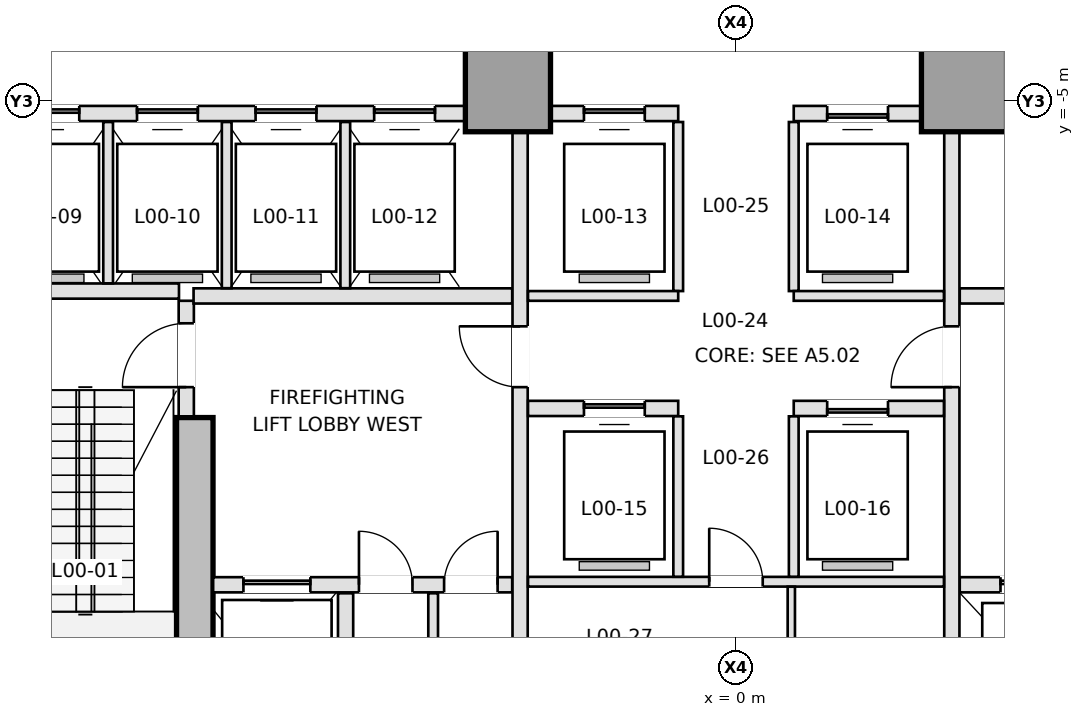
"""IFC4 building model, lengths in metres.
Left out: names, types, materials, properties, quantities, classifications, styles, units other than length and angle.
Written with IfcOpenShell. Run it as: python <this file> out.ifc"""

import sys

from ifc_helpers import new_model, si_unit, direction, frame, frame_2d, origin, origin_2d, place, context, subcontext, project, spatial, rectangle, extrude, element, fill, save


model = new_model("IFC4")
c1 = context("Model", 3, precision=1e-05, world=origin(), true_north=direction((0.0, 1.0)))
c2 = subcontext(c1, "Body", "Model", "MODEL_VIEW")
j1 = project(units=[si_unit("LENGTHUNIT", "METRE"), si_unit("PLANEANGLEUNIT", "RADIAN")], contexts=[c1])
p1 = place(None, origin())
s1 = spatial("IfcSite", under=j1, at=p1, CompositionType="ELEMENT")
p2 = place(p1, origin())
s2 = spatial("IfcBuilding", under=s1, at=p2, CompositionType="ELEMENT")
p3 = place(p2, origin())
s3 = spatial("IfcBuildingStorey", under=s2, at=p3, CompositionType="ELEMENT", Elevation=0.0)
p4 = place(p3, frame((-8.9, -16.15, 0.0), z_axis=(0.0, 0.0, 1.0), x_axis=(0.0, 1.0, 0.0)))
e1 = element("IfcWall", 1, at=p4, inside=s3, PredefinedType="SHEAR", context=c2, shape_type="SweptSolid", body=[
    extrude(rectangle(XDim=5.95, YDim=0.6, at=frame_2d((2.975, 0.0))), origin(), (0.0, 0.0, 1.0), 5.0),
])
for number, where, z_axis, x_axis in (
    (2, (-3.75, -4.8, 0.0), (0.0, 0.0, 1.0), (1.0, 0.0, 0.0)),
    (3, (3.75, -4.8, 0.0), (0.0, 0.0, 1.0), (1.0, 0.0, 0.0)),
):
    element("IfcColumn", number, at=place(p3, frame(where, z_axis=z_axis, x_axis=x_axis)), inside=s3, PredefinedType="COLUMN", context=c2, shape_type="SweptSolid", body=[
        extrude(rectangle(XDim=1.4, YDim=1.4, at=origin_2d()), origin(), (0.0, 0.0, 1.0), 5.0),
    ])
p5 = place(p3, frame((-9.04, -10.18, 0.0), z_axis=(0.0, 0.0, 1.0), x_axis=(0.0, 1.0, 0.0)))
e4 = element("IfcWall", 4, at=p5, inside=s3, PredefinedType="PARTITIONING", context=c2, shape_type="SweptSolid", body=[
    extrude(rectangle(XDim=1.9, YDim=0.25, at=frame_2d((0.95, 0.0))), origin(), (0.0, 0.0, 1.0), 4.7),
])
p6 = place(p5, frame((0.48, 0.0, 0.0)))
e5 = element("IfcOpeningElement", 5, at=p6, cuts=e4, PredefinedType="OPENING", context=c2, shape_type="SweptSolid", body=[
    extrude(rectangle(XDim=1.05, YDim=2.15, at=frame_2d((0.525, 1.075))), frame((0.0, 0.135, 0.0), z_axis=(0.0, -1.0, 0.0), x_axis=(1.0, 0.0, 0.0)), (0.0, 0.0, 1.0), 0.27),
])
p7 = place(p3, frame((-12.38, -8.12, 0.0), z_axis=(0.0, 0.0, 1.0), x_axis=(1.0, 0.0, 0.0)))
e6 = element("IfcWall", 6, at=p7, inside=s3, PredefinedType="PARTITIONING", context=c2, shape_type="SweptSolid", body=[
    extrude(rectangle(XDim=3.22, YDim=0.25, at=frame_2d((1.61, 0.0))), origin(), (0.0, 0.0, 1.0), 4.7),
])
p8 = place(p3, frame((-8.598, -12.95, 0.0), z_axis=(0.0, 0.0, 1.0), x_axis=(1.0, 0.0, 0.0)))
e7 = element("IfcWall", 7, at=p8, inside=s3, PredefinedType="PARTITIONING", context=c2, shape_type="SweptSolid", body=[
    extrude(rectangle(XDim=4.918, YDim=0.25, at=frame_2d((2.459, 0.0))), origin(), (0.0, 0.0, 1.0), 4.7),
])
p9 = place(p8, frame((0.498, 0.0, 0.0)))
e8 = element("IfcOpeningElement", 8, at=p9, cuts=e7, PredefinedType="OPENING", context=c2, shape_type="SweptSolid", body=[
    extrude(rectangle(XDim=1.1, YDim=2.15, at=frame_2d((0.55, 1.075))), frame((0.0, 0.135, 0.0), z_axis=(0.0, -1.0, 0.0), x_axis=(1.0, 0.0, 0.0)), (0.0, 0.0, 1.0), 0.27),
])
p10 = place(p8, frame((2.398, 0.0, 0.0)))
e9 = element("IfcOpeningElement", 9, at=p10, cuts=e7, PredefinedType="OPENING", context=c2, shape_type="SweptSolid", body=[
    extrude(rectangle(XDim=0.88, YDim=2.1, at=frame_2d((0.44, 1.05))), frame((0.0, 0.135, 0.0), z_axis=(0.0, -1.0, 0.0), x_axis=(1.0, 0.0, 0.0)), (0.0, 0.0, 1.0), 0.27),
])
p11 = place(p8, frame((3.798, 0.0, 0.0)))
e10 = element("IfcOpeningElement", 10, at=p11, cuts=e7, PredefinedType="OPENING", context=c2, shape_type="SweptSolid", body=[
    extrude(rectangle(XDim=0.88, YDim=2.1, at=frame_2d((0.44, 1.05))), frame((0.0, 0.135, 0.0), z_axis=(0.0, -1.0, 0.0), x_axis=(1.0, 0.0, 0.0)), (0.0, 0.0, 1.0), 0.27),
])
p12 = place(p3, frame((3.68, -12.95, 0.0), z_axis=(0.0, 0.0, 1.0), x_axis=(1.0, 0.0, 0.0)))
e11 = element("IfcWall", 11, at=p12, inside=s3, PredefinedType="PARTITIONING", context=c2, shape_type="SweptSolid", body=[
    extrude(rectangle(XDim=4.918, YDim=0.25, at=frame_2d((2.459, 0.0))), origin(), (0.0, 0.0, 1.0), 4.7),
])
p13 = place(p12, frame((3.32, 0.0, 0.0)))
e12 = element("IfcOpeningElement", 12, at=p13, cuts=e11, PredefinedType="OPENING", context=c2, shape_type="SweptSolid", body=[
    extrude(rectangle(XDim=1.1, YDim=2.15, at=frame_2d((0.55, 1.075))), frame((0.0, 0.135, 0.0), z_axis=(0.0, -1.0, 0.0), x_axis=(1.0, 0.0, 0.0)), (0.0, 0.0, 1.0), 0.27),
])
p14 = place(p12, frame((0.67, 0.0, 0.0)))
e13 = element("IfcOpeningElement", 13, at=p14, cuts=e11, PredefinedType="OPENING", context=c2, shape_type="SweptSolid", body=[
    extrude(rectangle(XDim=1.2, YDim=2.15, at=frame_2d((0.6, 1.075))), frame((0.0, 0.135, 0.0), z_axis=(0.0, -1.0, 0.0), x_axis=(1.0, 0.0, 0.0)), (0.0, 0.0, 1.0), 0.27),
])
p15 = place(p3, frame((-6.42, -15.848, 0.0), z_axis=(0.0, 0.0, 1.0), x_axis=(0.0, 1.0, 0.0)))
e14 = element("IfcWall", 14, at=p15, inside=s3, PredefinedType="PARTITIONING", context=c2, shape_type="SweptSolid", body=[
    extrude(rectangle(XDim=2.758, YDim=0.25, at=frame_2d((1.379, 0.0))), origin(), (0.0, 0.0, 1.0), 4.7),
])
p16 = place(p3, frame((-4.98, -15.848, 0.0), z_axis=(0.0, 0.0, 1.0), x_axis=(0.0, 1.0, 0.0)))
e15 = element("IfcWall", 15, at=p16, inside=s3, PredefinedType="PARTITIONING", context=c2, shape_type="SweptSolid", body=[
    extrude(rectangle(XDim=2.758, YDim=0.16, at=frame_2d((1.379, 0.0))), origin(), (0.0, 0.0, 1.0), 4.7),
])
for number, where, z_axis, x_axis in (
    (16, (-8.92, -8.2, 0.0), (0.0, 0.0, 1.0), (1.0, 0.0, 0.0)),
    (17, (3.68, -8.2, 0.0), (0.0, 0.0, 1.0), (1.0, 0.0, 0.0)),
):
    element("IfcWall", number, at=place(p3, frame(where, z_axis=z_axis, x_axis=x_axis)), inside=s3, PredefinedType="PARTITIONING", context=c2, shape_type="SweptSolid", body=[
        extrude(rectangle(XDim=5.24, YDim=0.25, at=frame_2d((2.62, 0.0))), origin(), (0.0, 0.0, 1.0), 4.7),
    ])
p17 = place(p3, frame((-3.55, -15.648, 0.0), z_axis=(0.0, 0.0, 1.0), x_axis=(0.0, 1.0, 0.0)))
e18 = element("IfcWall", 18, at=p17, inside=s3, PredefinedType="PARTITIONING", context=c2, shape_type="SweptSolid", body=[
    extrude(rectangle(XDim=10.146, YDim=0.25, at=frame_2d((5.073, 0.0))), origin(), (0.0, 0.0, 1.0), 4.7),
])
p18 = place(p17, frame((5.948, 0.0, 0.0)))
e19 = element("IfcOpeningElement", 19, at=p18, cuts=e18, PredefinedType="OPENING", context=c2, shape_type="SweptSolid", body=[
    extrude(rectangle(XDim=1.0, YDim=2.15, at=frame_2d((0.5, 1.075))), frame((0.0, 0.135, 0.0), z_axis=(0.0, -1.0, 0.0), x_axis=(1.0, 0.0, 0.0)), (0.0, 0.0, 1.0), 0.27),
])
p19 = place(p3, frame((3.55, -15.648, 0.0), z_axis=(0.0, 0.0, 1.0), x_axis=(0.0, 1.0, 0.0)))
e20 = element("IfcWall", 20, at=p19, inside=s3, PredefinedType="PARTITIONING", context=c2, shape_type="SweptSolid", body=[
    extrude(rectangle(XDim=10.146, YDim=0.25, at=frame_2d((5.073, 0.0))), origin(), (0.0, 0.0, 1.0), 4.7),
])
p20 = place(p19, frame((5.948, 0.0, 0.0)))
e21 = element("IfcOpeningElement", 21, at=p20, cuts=e20, PredefinedType="OPENING", context=c2, shape_type="SweptSolid", body=[
    extrude(rectangle(XDim=1.0, YDim=2.15, at=frame_2d((0.5, 1.075))), frame((0.0, 0.135, 0.0), z_axis=(0.0, -1.0, 0.0), x_axis=(1.0, 0.0, 0.0)), (0.0, 0.0, 1.0), 0.27),
])
p21 = place(p3, frame((-12.248, -5.2, 0.0), z_axis=(0.0, 0.0, 1.0), x_axis=(1.0, 0.0, 0.0)))
e22 = element("IfcWall", 22, at=p21, inside=s3, PredefinedType="PARTITIONING", context=c2, shape_type="SweptSolid", body=[
    extrude(rectangle(XDim=7.796, YDim=0.25, at=frame_2d((3.898, 0.0))), origin(), (0.0, 0.0, 1.0), 4.7),
])
p22 = place(p21, frame((0.448, 0.0, 0.0)))
e23 = element("IfcOpeningElement", 23, at=p22, cuts=e22, PredefinedType="OPENING", context=c2, shape_type="SweptSolid", body=[
    extrude(rectangle(XDim=1.0, YDim=2.15, at=frame_2d((0.5, 1.075))), frame((0.0, 0.135, 0.0), z_axis=(0.0, -1.0, 0.0), x_axis=(1.0, 0.0, 0.0)), (0.0, 0.0, 1.0), 0.27),
])
p23 = place(p21, frame((2.398, 0.0, 0.0)))
e24 = element("IfcOpeningElement", 24, at=p23, cuts=e22, PredefinedType="OPENING", context=c2, shape_type="SweptSolid", body=[
    extrude(rectangle(XDim=1.0, YDim=2.15, at=frame_2d((0.5, 1.075))), frame((0.0, 0.135, 0.0), z_axis=(0.0, -1.0, 0.0), x_axis=(1.0, 0.0, 0.0)), (0.0, 0.0, 1.0), 0.27),
])
p24 = place(p21, frame((4.348, 0.0, 0.0)))
e25 = element("IfcOpeningElement", 25, at=p24, cuts=e22, PredefinedType="OPENING", context=c2, shape_type="SweptSolid", body=[
    extrude(rectangle(XDim=1.0, YDim=2.15, at=frame_2d((0.5, 1.075))), frame((0.0, 0.135, 0.0), z_axis=(0.0, -1.0, 0.0), x_axis=(1.0, 0.0, 0.0)), (0.0, 0.0, 1.0), 0.27),
])
p25 = place(p21, frame((6.298, 0.0, 0.0)))
e26 = element("IfcOpeningElement", 26, at=p25, cuts=e22, PredefinedType="OPENING", context=c2, shape_type="SweptSolid", body=[
    extrude(rectangle(XDim=1.0, YDim=2.15, at=frame_2d((0.5, 1.075))), frame((0.0, 0.135, 0.0), z_axis=(0.0, -1.0, 0.0), x_axis=(1.0, 0.0, 0.0)), (0.0, 0.0, 1.0), 0.27),
])
p26 = place(p3, frame((-3.048, -5.2, 0.0), z_axis=(0.0, 0.0, 1.0), x_axis=(1.0, 0.0, 0.0)))
e27 = element("IfcWall", 27, at=p26, inside=s3, PredefinedType="PARTITIONING", context=c2, shape_type="SweptSolid", body=[
    extrude(rectangle(XDim=2.098, YDim=0.25, at=frame_2d((1.049, 0.0))), origin(), (0.0, 0.0, 1.0), 4.7),
])
p27 = place(p26, frame((0.548, 0.0, 0.0)))
e28 = element("IfcOpeningElement", 28, at=p27, cuts=e27, PredefinedType="OPENING", context=c2, shape_type="SweptSolid", body=[
    extrude(rectangle(XDim=1.0, YDim=2.15, at=frame_2d((0.5, 1.075))), frame((0.0, 0.135, 0.0), z_axis=(0.0, -1.0, 0.0), x_axis=(1.0, 0.0, 0.0)), (0.0, 0.0, 1.0), 0.27),
])
p28 = place(p3, frame((0.95, -5.2, 0.0), z_axis=(0.0, 0.0, 1.0), x_axis=(1.0, 0.0, 0.0)))
e29 = element("IfcWall", 29, at=p28, inside=s3, PredefinedType="PARTITIONING", context=c2, shape_type="SweptSolid", body=[
    extrude(rectangle(XDim=2.098, YDim=0.25, at=frame_2d((1.049, 0.0))), origin(), (0.0, 0.0, 1.0), 4.7),
])
p29 = place(p28, frame((0.55, 0.0, 0.0)))
e30 = element("IfcOpeningElement", 30, at=p29, cuts=e29, PredefinedType="OPENING", context=c2, shape_type="SweptSolid", body=[
    extrude(rectangle(XDim=1.0, YDim=2.15, at=frame_2d((0.5, 1.075))), frame((0.0, 0.135, 0.0), z_axis=(0.0, -1.0, 0.0), x_axis=(1.0, 0.0, 0.0)), (0.0, 0.0, 1.0), 0.27),
])
p30 = place(p3, frame((-10.325, -7.993, 0.0), z_axis=(0.0, 0.0, 1.0), x_axis=(0.0, 1.0, 0.0)))
e31 = element("IfcWall", 31, at=p30, inside=s3, PredefinedType="PARTITIONING", context=c2, shape_type="SweptSolid", body=[
    extrude(rectangle(XDim=2.653, YDim=0.16, at=frame_2d((1.326, 0.0))), origin(), (0.0, 0.0, 1.0), 4.7),
])
for number, where, z_axis, x_axis in (
    (32, (-8.375, -8.073, 0.0), (0.0, 0.0, 1.0), (0.0, 1.0, 0.0)),
    (33, (-6.425, -8.073, 0.0), (0.0, 0.0, 1.0), (0.0, 1.0, 0.0)),
):
    element("IfcWall", number, at=place(p3, frame(where, z_axis=z_axis, x_axis=x_axis)), inside=s3, PredefinedType="PARTITIONING", context=c2, shape_type="SweptSolid", body=[
        extrude(rectangle(XDim=2.733, YDim=0.16, at=frame_2d((1.366, 0.0))), origin(), (0.0, 0.0, 1.0), 4.7),
    ])
for number, where, z_axis, x_axis in (
    (34, (-0.95, -8.12, 0.0), (0.0, 0.0, 1.0), (0.0, 1.0, 0.0)),
    (35, (0.95, -8.12, 0.0), (0.0, 0.0, 1.0), (0.0, 1.0, 0.0)),
):
    element("IfcWall", number, at=place(p3, frame(where, z_axis=z_axis, x_axis=x_axis)), inside=s3, PredefinedType="PARTITIONING", context=c2, shape_type="SweptSolid", body=[
        extrude(rectangle(XDim=2.78, YDim=0.16, at=frame_2d((1.39, 0.0))), origin(), (0.0, 0.0, 1.0), 4.7),
    ])
for number, where, z_axis, x_axis in (
    (36, (-3.42, -8.2, 0.0), (0.0, 0.0, 1.0), (1.0, 0.0, 0.0)),
    (37, (0.95, -8.2, 0.0), (0.0, 0.0, 1.0), (1.0, 0.0, 0.0)),
):
    element("IfcWall", number, at=place(p3, frame(where, z_axis=z_axis, x_axis=x_axis)), inside=s3, PredefinedType="PARTITIONING", context=c2, shape_type="SweptSolid", body=[
        extrude(rectangle(XDim=2.47, YDim=0.16, at=frame_2d((1.235, 0.0))), origin(), (0.0, 0.0, 1.0), 4.7),
    ])
p31 = place(p3, frame((-3.42, -10.05, 0.0), z_axis=(0.0, 0.0, 1.0), x_axis=(1.0, 0.0, 0.0)))
e38 = element("IfcWall", 38, at=p31, inside=s3, PredefinedType="PARTITIONING", context=c2, shape_type="SweptSolid", body=[
    extrude(rectangle(XDim=2.47, YDim=0.25, at=frame_2d((1.235, 0.0))), origin(), (0.0, 0.0, 1.0), 4.7),
])
p32 = place(p31, frame((0.92, 0.0, 0.0)))
e39 = element("IfcOpeningElement", 39, at=p32, cuts=e38, PredefinedType="OPENING", context=c2, shape_type="SweptSolid", body=[
    extrude(rectangle(XDim=1.0, YDim=2.15, at=frame_2d((0.5, 1.075))), frame((0.0, 0.135, 0.0), z_axis=(0.0, -1.0, 0.0), x_axis=(1.0, 0.0, 0.0)), (0.0, 0.0, 1.0), 0.27),
])
p33 = place(p3, frame((0.95, -10.05, 0.0), z_axis=(0.0, 0.0, 1.0), x_axis=(1.0, 0.0, 0.0)))
e40 = element("IfcWall", 40, at=p33, inside=s3, PredefinedType="PARTITIONING", context=c2, shape_type="SweptSolid", body=[
    extrude(rectangle(XDim=2.47, YDim=0.25, at=frame_2d((1.235, 0.0))), origin(), (0.0, 0.0, 1.0), 4.7),
])
p34 = place(p33, frame((0.55, 0.0, 0.0)))
e41 = element("IfcOpeningElement", 41, at=p34, cuts=e40, PredefinedType="OPENING", context=c2, shape_type="SweptSolid", body=[
    extrude(rectangle(XDim=1.0, YDim=2.15, at=frame_2d((0.5, 1.075))), frame((0.0, 0.135, 0.0), z_axis=(0.0, -1.0, 0.0), x_axis=(1.0, 0.0, 0.0)), (0.0, 0.0, 1.0), 0.27),
])
p35 = place(p3, frame((-3.42, -12.9, 0.0), z_axis=(0.0, 0.0, 1.0), x_axis=(1.0, 0.0, 0.0)))
e42 = element("IfcWall", 42, at=p35, inside=s3, PredefinedType="PARTITIONING", context=c2, shape_type="SweptSolid", body=[
    extrude(rectangle(XDim=6.84, YDim=0.16, at=frame_2d((3.42, 0.0))), origin(), (0.0, 0.0, 1.0), 4.7),
])
p36 = place(p35, frame((2.98, 0.0, 0.0)))
e43 = element("IfcOpeningElement", 43, at=p36, cuts=e42, PredefinedType="OPENING", context=c2, shape_type="SweptSolid", body=[
    extrude(rectangle(XDim=0.88, YDim=2.12, at=frame_2d((0.44, 1.06))), frame((0.0, 0.09, 0.0), z_axis=(0.0, -1.0, 0.0), x_axis=(1.0, 0.0, 0.0)), (0.0, 0.0, 1.0), 0.18),
])
for number, where, z_axis, x_axis in (
    (44, (-0.95, -12.818, 0.0), (0.0, 0.0, 1.0), (0.0, 1.0, 0.0)),
    (45, (0.95, -12.818, 0.0), (0.0, 0.0, 1.0), (0.0, 1.0, 0.0)),
):
    element("IfcWall", number, at=place(p3, frame(where, z_axis=z_axis, x_axis=x_axis)), inside=s3, PredefinedType="PARTITIONING", context=c2, shape_type="SweptSolid", body=[
        extrude(rectangle(XDim=2.638, YDim=0.16, at=frame_2d((1.319, 0.0))), origin(), (0.0, 0.0, 1.0), 4.7),
    ])
p37 = place(p3, frame((0.91, -16.02, 0.0), z_axis=(0.0, 0.0, 1.0), x_axis=(0.0, 1.0, 0.0)))
e46 = element("IfcWall", 46, at=p37, inside=s3, PredefinedType="PARTITIONING", context=c2, shape_type="SweptSolid", body=[
    extrude(rectangle(XDim=3.038, YDim=0.12, at=frame_2d((1.519, 0.0))), origin(), (0.0, 0.0, 1.0), 4.7),
])
p38 = place(p37, frame((1.05, 0.0, 0.0)))
e47 = element("IfcOpeningElement", 47, at=p38, cuts=e46, PredefinedType="OPENING", context=c2, shape_type="SweptSolid", body=[
    extrude(rectangle(XDim=0.88, YDim=2.12, at=frame_2d((0.44, 1.06))), frame((0.0, 0.07, 0.0), z_axis=(0.0, -1.0, 0.0), x_axis=(1.0, 0.0, 0.0)), (0.0, 0.0, 1.0), 0.14),
])
p39 = place(p22, origin())
e48 = element("IfcDoor", 48, at=p39, inside=s3, OperationType="SLIDING_TO_LEFT", PredefinedType="DOOR", context=c2, shape_type="SweptSolid", body=[
    extrude(rectangle(XDim=1.0, YDim=2.15, at=frame_2d((0.5, 1.075))), frame((0.0, 0.025, 0.0), z_axis=(0.0, -1.0, 0.0), x_axis=(1.0, 0.0, 0.0)), (0.0, 0.0, 1.0), 0.05),
])
fill(e23, e48)
p40 = place(p23, origin())
e49 = element("IfcDoor", 49, at=p40, inside=s3, OperationType="SLIDING_TO_LEFT", PredefinedType="DOOR", context=c2, shape_type="SweptSolid", body=[
    extrude(rectangle(XDim=1.0, YDim=2.15, at=frame_2d((0.5, 1.075))), frame((0.0, 0.025, 0.0), z_axis=(0.0, -1.0, 0.0), x_axis=(1.0, 0.0, 0.0)), (0.0, 0.0, 1.0), 0.05),
])
fill(e24, e49)
p41 = place(p24, origin())
e50 = element("IfcDoor", 50, at=p41, inside=s3, OperationType="SLIDING_TO_LEFT", PredefinedType="DOOR", context=c2, shape_type="SweptSolid", body=[
    extrude(rectangle(XDim=1.0, YDim=2.15, at=frame_2d((0.5, 1.075))), frame((0.0, 0.025, 0.0), z_axis=(0.0, -1.0, 0.0), x_axis=(1.0, 0.0, 0.0)), (0.0, 0.0, 1.0), 0.05),
])
fill(e25, e50)
p42 = place(p25, origin())
e51 = element("IfcDoor", 51, at=p42, inside=s3, OperationType="SLIDING_TO_LEFT", PredefinedType="DOOR", context=c2, shape_type="SweptSolid", body=[
    extrude(rectangle(XDim=1.0, YDim=2.15, at=frame_2d((0.5, 1.075))), frame((0.0, 0.025, 0.0), z_axis=(0.0, -1.0, 0.0), x_axis=(1.0, 0.0, 0.0)), (0.0, 0.0, 1.0), 0.05),
])
fill(e26, e51)
p43 = place(p27, origin())
e52 = element("IfcDoor", 52, at=p43, inside=s3, OperationType="SLIDING_TO_LEFT", PredefinedType="DOOR", context=c2, shape_type="SweptSolid", body=[
    extrude(rectangle(XDim=1.0, YDim=2.15, at=frame_2d((0.5, 1.075))), frame((0.0, 0.025, 0.0), z_axis=(0.0, -1.0, 0.0), x_axis=(1.0, 0.0, 0.0)), (0.0, 0.0, 1.0), 0.05),
])
fill(e28, e52)
p44 = place(p29, origin())
e53 = element("IfcDoor", 53, at=p44, inside=s3, OperationType="SLIDING_TO_RIGHT", PredefinedType="DOOR", context=c2, shape_type="SweptSolid", body=[
    extrude(rectangle(XDim=1.0, YDim=2.15, at=frame_2d((0.5, 1.075))), frame((0.0, 0.025, 0.0), z_axis=(0.0, -1.0, 0.0), x_axis=(1.0, 0.0, 0.0)), (0.0, 0.0, 1.0), 0.05),
])
fill(e30, e53)
p45 = place(p9, origin())
e54 = element("IfcDoor", 54, at=p45, inside=s3, OperationType="SLIDING_TO_LEFT", PredefinedType="DOOR", context=c2, shape_type="SweptSolid", body=[
    extrude(rectangle(XDim=1.1, YDim=2.15, at=frame_2d((0.55, 1.075))), frame((0.0, 0.025, 0.0), z_axis=(0.0, -1.0, 0.0), x_axis=(1.0, 0.0, 0.0)), (0.0, 0.0, 1.0), 0.05),
])
fill(e8, e54)
p46 = place(p14, origin())
e55 = element("IfcDoor", 55, at=p46, inside=s3, OperationType="SLIDING_TO_LEFT", PredefinedType="DOOR", context=c2, shape_type="SweptSolid", body=[
    extrude(rectangle(XDim=1.2, YDim=2.15, at=frame_2d((0.6, 1.075))), frame((0.0, 0.025, 0.0), z_axis=(0.0, -1.0, 0.0), x_axis=(1.0, 0.0, 0.0)), (0.0, 0.0, 1.0), 0.05),
])
fill(e13, e55)
p47 = place(p32, origin())
e56 = element("IfcDoor", 56, at=p47, inside=s3, OperationType="SLIDING_TO_LEFT", PredefinedType="DOOR", context=c2, shape_type="SweptSolid", body=[
    extrude(rectangle(XDim=1.0, YDim=2.15, at=frame_2d((0.5, 1.075))), frame((0.0, 0.025, 0.0), z_axis=(0.0, -1.0, 0.0), x_axis=(1.0, 0.0, 0.0)), (0.0, 0.0, 1.0), 0.05),
])
fill(e39, e56)
p48 = place(p34, origin())
e57 = element("IfcDoor", 57, at=p48, inside=s3, OperationType="SLIDING_TO_RIGHT", PredefinedType="DOOR", context=c2, shape_type="SweptSolid", body=[
    extrude(rectangle(XDim=1.0, YDim=2.15, at=frame_2d((0.5, 1.075))), frame((0.0, 0.025, 0.0), z_axis=(0.0, -1.0, 0.0), x_axis=(1.0, 0.0, 0.0)), (0.0, 0.0, 1.0), 0.05),
])
fill(e41, e57)
p49 = place(p6, origin())
e58 = element("IfcDoor", 58, at=p49, inside=s3, OperationType="SINGLE_SWING_LEFT", PredefinedType="DOOR", context=c2, shape_type="SweptSolid", body=[
    extrude(rectangle(XDim=1.05, YDim=2.15, at=frame_2d((0.525, 1.075))), frame((0.0, 0.025, 0.0), z_axis=(0.0, -1.0, 0.0), x_axis=(1.0, 0.0, 0.0)), (0.0, 0.0, 1.0), 0.05),
])
fill(e5, e58)
p50 = place(p10, origin())
e59 = element("IfcDoor", 59, at=p50, inside=s3, OperationType="SINGLE_SWING_LEFT", PredefinedType="TRAPDOOR", context=c2, shape_type="SweptSolid", body=[
    extrude(rectangle(XDim=0.88, YDim=2.1, at=frame_2d((0.44, 1.05))), frame((0.0, 0.025, 0.0), z_axis=(0.0, -1.0, 0.0), x_axis=(1.0, 0.0, 0.0)), (0.0, 0.0, 1.0), 0.05),
])
fill(e9, e59)
p51 = place(p11, origin())
e60 = element("IfcDoor", 60, at=p51, inside=s3, OperationType="SINGLE_SWING_RIGHT", PredefinedType="TRAPDOOR", context=c2, shape_type="SweptSolid", body=[
    extrude(rectangle(XDim=0.88, YDim=2.1, at=frame_2d((0.44, 1.05))), frame((0.0, 0.025, 0.0), z_axis=(0.0, -1.0, 0.0), x_axis=(1.0, 0.0, 0.0)), (0.0, 0.0, 1.0), 0.05),
])
fill(e10, e60)
p52 = place(p18, origin())
e61 = element("IfcDoor", 61, at=p52, inside=s3, OperationType="SINGLE_SWING_RIGHT", PredefinedType="DOOR", context=c2, shape_type="SweptSolid", body=[
    extrude(rectangle(XDim=1.0, YDim=2.15, at=frame_2d((0.5, 1.075))), frame((0.0, 0.025, 0.0), z_axis=(0.0, -1.0, 0.0), x_axis=(1.0, 0.0, 0.0)), (0.0, 0.0, 1.0), 0.05),
])
fill(e19, e61)
p53 = place(p20, origin())
e62 = element("IfcDoor", 62, at=p53, inside=s3, OperationType="SINGLE_SWING_LEFT", PredefinedType="DOOR", context=c2, shape_type="SweptSolid", body=[
    extrude(rectangle(XDim=1.0, YDim=2.15, at=frame_2d((0.5, 1.075))), frame((0.0, 0.025, 0.0), z_axis=(0.0, -1.0, 0.0), x_axis=(1.0, 0.0, 0.0)), (0.0, 0.0, 1.0), 0.05),
])
fill(e21, e62)
p54 = place(p36, origin())
e63 = element("IfcDoor", 63, at=p54, inside=s3, OperationType="SINGLE_SWING_LEFT", PredefinedType="DOOR", context=c2, shape_type="SweptSolid", body=[
    extrude(rectangle(XDim=0.88, YDim=2.12, at=frame_2d((0.44, 1.06))), frame((0.0, 0.025, 0.0), z_axis=(0.0, -1.0, 0.0), x_axis=(1.0, 0.0, 0.0)), (0.0, 0.0, 1.0), 0.05),
])
fill(e43, e63)
save(model, sys.argv[1])
